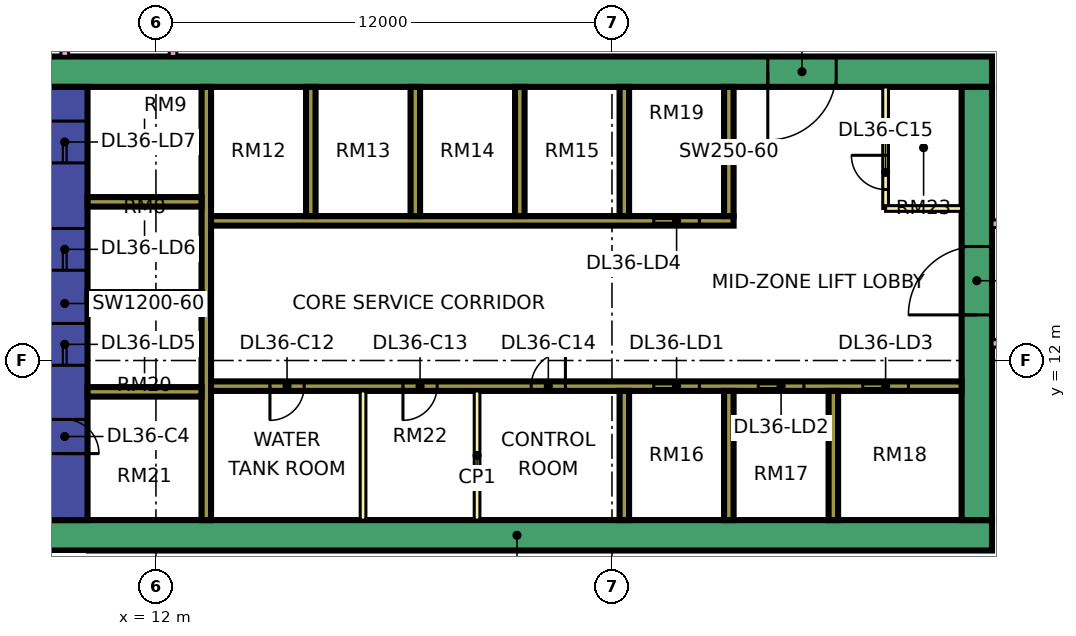
"""IFC4 building model, lengths in metres.
Left out: names, types, materials, properties, quantities, classifications, styles, units other than length and angle.
Written with IfcOpenShell. Run it as: python <this file> out.ifc"""

import sys

from ifc_helpers import new_model, si_unit, direction, frame, frame_2d, origin, place, context, subcontext, project, spatial, rectangle, extrude, element, fill, save


model = new_model("IFC4")
c1 = context("Model", 3, precision=1e-05, world=origin(), true_north=direction((0.0, 1.0)))
c2 = subcontext(c1, "Body", "Model", "MODEL_VIEW")
j1 = project(units=[si_unit("LENGTHUNIT", "METRE"), si_unit("PLANEANGLEUNIT", "RADIAN")], contexts=[c1])
p1 = place(None, origin())
s1 = spatial("IfcSite", under=j1, at=p1, CompositionType="ELEMENT")
p2 = place(p1, origin())
s2 = spatial("IfcBuilding", under=s1, at=p2, CompositionType="ELEMENT")
p3 = place(p2, frame((0.0, 0.0, 161.15)))
s3 = spatial("IfcBuildingStorey", under=s2, at=p3, CompositionType="ELEMENT", Elevation=161.15)
p4 = place(p3, frame((9.0, 7.4, 0.0), z_axis=(0.0, 0.0, 1.0), x_axis=(1.0, 0.0, 0.0)))
e1 = element("IfcWall", 1, at=p4, inside=s3, PredefinedType="SHEAR", context=c2, shape_type="SweptSolid", body=[
    extrude(rectangle(XDim=25.0, YDim=0.8, at=frame_2d((12.5, 0.0))), origin(), (0.0, 0.0, 1.0), 3.75),
])
p5 = place(p3, frame((9.0, 19.6, 0.0), z_axis=(0.0, 0.0, 1.0), x_axis=(1.0, 0.0, 0.0)))
e2 = element("IfcWall", 2, at=p5, inside=s3, PredefinedType="SHEAR", context=c2, shape_type="SweptSolid", body=[
    extrude(rectangle(XDim=25.0, YDim=0.8, at=frame_2d((12.5, 0.0))), origin(), (0.0, 0.0, 1.0), 3.75),
])
p6 = place(p5, frame((19.1, 0.0, 0.0)))
e3 = element("IfcOpeningElement", 3, at=p6, cuts=e2, PredefinedType="OPENING", context=c2, shape_type="SweptSolid", body=[
    extrude(rectangle(XDim=1.8, YDim=2.4, at=frame_2d((0.9, 1.2))), frame((0.0, 0.41, 0.0), z_axis=(0.0, -1.0, 0.0), x_axis=(1.0, 0.0, 0.0)), (0.0, 0.0, 1.0), 0.82),
])
p7 = place(p3, frame((9.6, 7.8, 0.0), z_axis=(0.0, 0.0, 1.0), x_axis=(0.0, 1.0, 0.0)))
e4 = element("IfcWall", 4, at=p7, inside=s3, PredefinedType="SHEAR", context=c2, shape_type="SweptSolid", body=[
    extrude(rectangle(XDim=11.4, YDim=1.2, at=frame_2d((5.7, 0.0))), origin(), (0.0, 0.0, 1.0), 3.75),
])
p8 = place(p7, frame((4.075, 0.0, 0.0)))
e5 = element("IfcOpeningElement", 5, at=p8, cuts=e4, PredefinedType="OPENING", context=c2, shape_type="SweptSolid", body=[
    extrude(rectangle(XDim=1.1, YDim=2.2, at=frame_2d((0.55, 1.1))), frame((0.0, 0.61, 0.0), z_axis=(0.0, -1.0, 0.0), x_axis=(1.0, 0.0, 0.0)), (0.0, 0.0, 1.0), 1.22),
])
p9 = place(p7, frame((6.575, 0.0, 0.0)))
e6 = element("IfcOpeningElement", 6, at=p9, cuts=e4, PredefinedType="OPENING", context=c2, shape_type="SweptSolid", body=[
    extrude(rectangle(XDim=1.1, YDim=2.2, at=frame_2d((0.55, 1.1))), frame((0.0, 0.61, 0.0), z_axis=(0.0, -1.0, 0.0), x_axis=(1.0, 0.0, 0.0)), (0.0, 0.0, 1.0), 1.22),
])
p10 = place(p7, frame((9.4, 0.0, 0.0)))
e7 = element("IfcOpeningElement", 7, at=p10, cuts=e4, PredefinedType="OPENING", context=c2, shape_type="SweptSolid", body=[
    extrude(rectangle(XDim=1.1, YDim=2.2, at=frame_2d((0.55, 1.1))), frame((0.0, 0.61, 0.0), z_axis=(0.0, -1.0, 0.0), x_axis=(1.0, 0.0, 0.0)), (0.0, 0.0, 1.0), 1.22),
])
p11 = place(p7, frame((1.75, 0.0, 0.0)))
e8 = element("IfcOpeningElement", 8, at=p11, cuts=e4, PredefinedType="OPENING", context=c2, shape_type="SweptSolid", body=[
    extrude(rectangle(XDim=0.9, YDim=2.1, at=frame_2d((0.45, 1.05))), frame((0.0, 0.61, 0.0), z_axis=(0.0, -1.0, 0.0), x_axis=(1.0, 0.0, 0.0)), (0.0, 0.0, 1.0), 1.22),
])
p12 = place(p3, frame((33.6, 7.8, 0.0), z_axis=(0.0, 0.0, 1.0), x_axis=(0.0, 1.0, 0.0)))
e9 = element("IfcWall", 9, at=p12, inside=s3, PredefinedType="SHEAR", context=c2, shape_type="SweptSolid", body=[
    extrude(rectangle(XDim=11.4, YDim=0.8, at=frame_2d((5.7, 0.0))), origin(), (0.0, 0.0, 1.0), 3.75),
])
p13 = place(p12, frame((5.4, 0.0, 0.0)))
e10 = element("IfcOpeningElement", 10, at=p13, cuts=e9, PredefinedType="OPENING", context=c2, shape_type="SweptSolid", body=[
    extrude(rectangle(XDim=1.8, YDim=2.4, at=frame_2d((0.9, 1.2))), frame((0.0, 0.41, 0.0), z_axis=(0.0, -1.0, 0.0), x_axis=(1.0, 0.0, 0.0)), (0.0, 0.0, 1.0), 0.82),
])
p14 = place(p3, frame((13.325, 7.8, 0.0), z_axis=(0.0, 0.0, 1.0), x_axis=(0.0, 1.0, 0.0)))
e11 = element("IfcWall", 11, at=p14, inside=s3, PredefinedType="SHEAR", context=c2, shape_type="SweptSolid", body=[
    extrude(rectangle(XDim=11.4, YDim=0.25, at=frame_2d((5.7, 0.0))), origin(), (0.0, 0.0, 1.0), 3.75),
])
p15 = place(p3, frame((13.45, 11.325, 0.0), z_axis=(0.0, 0.0, 1.0), x_axis=(1.0, 0.0, 0.0)))
e12 = element("IfcWall", 12, at=p15, inside=s3, PredefinedType="SHEAR", context=c2, shape_type="SweptSolid", body=[
    extrude(rectangle(XDim=19.75, YDim=0.25, at=frame_2d((9.875, 0.0))), origin(), (0.0, 0.0, 1.0), 3.75),
])
p16 = place(p15, frame((11.65, 0.0, 0.0)))
e13 = element("IfcOpeningElement", 13, at=p16, cuts=e12, PredefinedType="OPENING", context=c2, shape_type="SweptSolid", body=[
    extrude(rectangle(XDim=1.2, YDim=2.2, at=frame_2d((0.6, 1.1))), frame((0.0, 0.135, 0.0), z_axis=(0.0, -1.0, 0.0), x_axis=(1.0, 0.0, 0.0)), (0.0, 0.0, 1.0), 0.27),
])
p17 = place(p15, frame((14.4, 0.0, 0.0)))
e14 = element("IfcOpeningElement", 14, at=p17, cuts=e12, PredefinedType="OPENING", context=c2, shape_type="SweptSolid", body=[
    extrude(rectangle(XDim=1.2, YDim=2.2, at=frame_2d((0.6, 1.1))), frame((0.0, 0.135, 0.0), z_axis=(0.0, -1.0, 0.0), x_axis=(1.0, 0.0, 0.0)), (0.0, 0.0, 1.0), 0.27),
])
p18 = place(p15, frame((17.15, 0.0, 0.0)))
e15 = element("IfcOpeningElement", 15, at=p18, cuts=e12, PredefinedType="OPENING", context=c2, shape_type="SweptSolid", body=[
    extrude(rectangle(XDim=1.2, YDim=2.2, at=frame_2d((0.6, 1.1))), frame((0.0, 0.135, 0.0), z_axis=(0.0, -1.0, 0.0), x_axis=(1.0, 0.0, 0.0)), (0.0, 0.0, 1.0), 0.27),
])
p19 = place(p15, frame((1.55, 0.0, 0.0)))
e16 = element("IfcOpeningElement", 16, at=p19, cuts=e12, PredefinedType="OPENING", context=c2, shape_type="SweptSolid", body=[
    extrude(rectangle(XDim=0.9, YDim=2.1, at=frame_2d((0.45, 1.05))), frame((0.0, 0.135, 0.0), z_axis=(0.0, -1.0, 0.0), x_axis=(1.0, 0.0, 0.0)), (0.0, 0.0, 1.0), 0.27),
])
p20 = place(p15, frame((5.05, 0.0, 0.0)))
e17 = element("IfcOpeningElement", 17, at=p20, cuts=e12, PredefinedType="OPENING", context=c2, shape_type="SweptSolid", body=[
    extrude(rectangle(XDim=0.9, YDim=2.1, at=frame_2d((0.45, 1.05))), frame((0.0, 0.135, 0.0), z_axis=(0.0, -1.0, 0.0), x_axis=(1.0, 0.0, 0.0)), (0.0, 0.0, 1.0), 0.27),
])
p21 = place(p15, frame((8.425, 0.0, 0.0)))
e18 = element("IfcOpeningElement", 18, at=p21, cuts=e12, PredefinedType="OPENING", context=c2, shape_type="SweptSolid", body=[
    extrude(rectangle(XDim=0.9, YDim=2.1, at=frame_2d((0.45, 1.05))), frame((0.0, 0.135, 0.0), z_axis=(0.0, -1.0, 0.0), x_axis=(1.0, 0.0, 0.0)), (0.0, 0.0, 1.0), 0.27),
])
p22 = place(p3, frame((13.45, 15.675, 0.0), z_axis=(0.0, 0.0, 1.0), x_axis=(1.0, 0.0, 0.0)))
e19 = element("IfcWall", 19, at=p22, inside=s3, PredefinedType="SHEAR", context=c2, shape_type="SweptSolid", body=[
    extrude(rectangle(XDim=13.75, YDim=0.25, at=frame_2d((6.875, 0.0))), origin(), (0.0, 0.0, 1.0), 3.75),
])
p23 = place(p22, frame((11.65, 0.0, 0.0)))
e20 = element("IfcOpeningElement", 20, at=p23, cuts=e19, PredefinedType="OPENING", context=c2, shape_type="SweptSolid", body=[
    extrude(rectangle(XDim=1.2, YDim=2.2, at=frame_2d((0.6, 1.1))), frame((0.0, 0.135, 0.0), z_axis=(0.0, -1.0, 0.0), x_axis=(1.0, 0.0, 0.0)), (0.0, 0.0, 1.0), 0.27),
])
for number, where, z_axis, x_axis in (
    (21, (10.2, 11.175, 0.0), (0.0, 0.0, 1.0), (1.0, 0.0, 0.0)),
    (22, (10.2, 13.675, 0.0), (0.0, 0.0, 1.0), (1.0, 0.0, 0.0)),
    (23, (10.2, 16.175, 0.0), (0.0, 0.0, 1.0), (1.0, 0.0, 0.0)),
):
    element("IfcWall", number, at=place(p3, frame(where, z_axis=z_axis, x_axis=x_axis)), inside=s3, PredefinedType="SHEAR", context=c2, shape_type="SweptSolid", body=[
        extrude(rectangle(XDim=3.0, YDim=0.25, at=frame_2d((1.5, 0.0))), origin(), (0.0, 0.0, 1.0), 3.75),
    ])
for number, where, z_axis, x_axis in (
    (24, (24.325, 7.8, 0.0), (0.0, 0.0, 1.0), (0.0, 1.0, 0.0)),
    (25, (27.075, 7.8, 0.0), (0.0, 0.0, 1.0), (0.0, 1.0, 0.0)),
    (26, (29.825, 7.8, 0.0), (0.0, 0.0, 1.0), (0.0, 1.0, 0.0)),
    (27, (16.075, 15.8, 0.0), (0.0, 0.0, 1.0), (0.0, 1.0, 0.0)),
    (28, (18.825, 15.8, 0.0), (0.0, 0.0, 1.0), (0.0, 1.0, 0.0)),
    (29, (21.575, 15.8, 0.0), (0.0, 0.0, 1.0), (0.0, 1.0, 0.0)),
    (30, (24.325, 15.8, 0.0), (0.0, 0.0, 1.0), (0.0, 1.0, 0.0)),
    (31, (27.075, 15.8, 0.0), (0.0, 0.0, 1.0), (0.0, 1.0, 0.0)),
):
    element("IfcWall", number, at=place(p3, frame(where, z_axis=z_axis, x_axis=x_axis)), inside=s3, PredefinedType="SHEAR", context=c2, shape_type="SweptSolid", body=[
        extrude(rectangle(XDim=3.4, YDim=0.25, at=frame_2d((1.7, 0.0))), origin(), (0.0, 0.0, 1.0), 3.75),
    ])
p24 = place(p3, frame((-1.447, 12.553, 0.0), z_axis=(0.0, 0.0, 1.0), x_axis=(0.707106781187, -0.707106781187, 0.0)))
e32 = element("IfcWall", 32, at=p24, inside=s3, PredefinedType="SOLIDWALL", context=c2, shape_type="SweptSolid", body=[
    extrude(rectangle(XDim=19.799, YDim=0.15, at=frame_2d((9.899, 0.0))), origin(), (0.0, 0.0, 1.0), 3.35),
])
p25 = place(p24, frame((2.212, 0.0, 0.45)))
e33 = element("IfcOpeningElement", 33, at=p25, cuts=e32, PredefinedType="OPENING", context=c2, shape_type="SweptSolid", body=[
    extrude(rectangle(XDim=3.0, YDim=2.4, at=frame_2d((1.5, 1.2))), frame((0.0, 0.085, 0.0), z_axis=(0.0, -1.0, 0.0), x_axis=(1.0, 0.0, 0.0)), (0.0, 0.0, 1.0), 0.17),
])
p26 = place(p24, frame((10.216, 0.0, 0.45)))
e34 = element("IfcOpeningElement", 34, at=p26, cuts=e32, PredefinedType="OPENING", context=c2, shape_type="SweptSolid", body=[
    extrude(rectangle(XDim=3.0, YDim=2.4, at=frame_2d((1.5, 1.2))), frame((0.0, 0.085, 0.0), z_axis=(0.0, -1.0, 0.0), x_axis=(1.0, 0.0, 0.0)), (0.0, 0.0, 1.0), 0.17),
])
for number, where, z_axis, x_axis in (
    (35, (17.45, 7.8, 0.0), (0.0, 0.0, 1.0), (0.0, 1.0, 0.0)),
    (36, (20.45, 7.8, 0.0), (0.0, 0.0, 1.0), (0.0, 1.0, 0.0)),
):
    element("IfcWall", number, at=place(p3, frame(where, z_axis=z_axis, x_axis=x_axis)), inside=s3, PredefinedType="PARTITIONING", context=c2, shape_type="SweptSolid", body=[
        extrude(rectangle(XDim=3.4, YDim=0.15, at=frame_2d((1.7, 0.0))), origin(), (0.0, 0.0, 1.0), 3.35),
    ])
p27 = place(p3, frame((31.2, 16.0, 0.0), z_axis=(0.0, 0.0, 1.0), x_axis=(0.0, 1.0, 0.0)))
e37 = element("IfcWall", 37, at=p27, inside=s3, PredefinedType="PARTITIONING", context=c2, shape_type="SweptSolid", body=[
    extrude(rectangle(XDim=3.2, YDim=0.15, at=frame_2d((1.6, 0.0))), origin(), (0.0, 0.0, 1.0), 3.35),
])
p28 = place(p27, frame((0.5, 0.0, 0.0)))
e38 = element("IfcOpeningElement", 38, at=p28, cuts=e37, PredefinedType="OPENING", context=c2, shape_type="SweptSolid", body=[
    extrude(rectangle(XDim=0.9, YDim=2.1, at=frame_2d((0.45, 1.05))), frame((0.0, 0.085, 0.0), z_axis=(0.0, -1.0, 0.0), x_axis=(1.0, 0.0, 0.0)), (0.0, 0.0, 1.0), 0.17),
])
p29 = place(p3, frame((31.2, 16.0, 0.0), z_axis=(0.0, 0.0, 1.0), x_axis=(1.0, 0.0, 0.0)))
e39 = element("IfcWall", 39, at=p29, inside=s3, PredefinedType="PARTITIONING", context=c2, shape_type="SweptSolid", body=[
    extrude(rectangle(XDim=2.0, YDim=0.15, at=frame_2d((1.0, 0.0))), origin(), (0.0, 0.0, 1.0), 3.35),
])
p30 = place(p3, frame((9.6, 20.0, 0.0), z_axis=(0.0, 0.0, 1.0), x_axis=(0.0, 1.0, 0.0)))
e40 = element("IfcWall", 40, at=p30, inside=s3, PredefinedType="PARTITIONING", context=c2, shape_type="SweptSolid", body=[
    extrude(rectangle(XDim=42.926, YDim=0.2, at=frame_2d((21.463, 0.0))), origin(), (0.0, 0.0, 1.0), 3.35),
])
p31 = place(p30, frame((40.8, 0.0, 0.0)))
e41 = element("IfcOpeningElement", 41, at=p31, cuts=e40, PredefinedType="OPENING", context=c2, shape_type="SweptSolid", body=[
    extrude(rectangle(XDim=1.0, YDim=2.1, at=frame_2d((0.5, 1.05))), frame((0.0, 0.11, 0.0), z_axis=(0.0, -1.0, 0.0), x_axis=(1.0, 0.0, 0.0)), (0.0, 0.0, 1.0), 0.22),
])
p32 = place(p30, frame((0.6, 0.0, 0.0)))
e42 = element("IfcOpeningElement", 42, at=p32, cuts=e40, PredefinedType="OPENING", context=c2, shape_type="SweptSolid", body=[
    extrude(rectangle(XDim=1.2, YDim=2.1, at=frame_2d((0.6, 1.05))), frame((0.0, 0.11, 0.0), z_axis=(0.0, -1.0, 0.0), x_axis=(1.0, 0.0, 0.0)), (0.0, 0.0, 1.0), 0.22),
])
p33 = place(p30, frame((3.9, 0.0, 0.0)))
e43 = element("IfcOpeningElement", 43, at=p33, cuts=e40, PredefinedType="OPENING", context=c2, shape_type="SweptSolid", body=[
    extrude(rectangle(XDim=1.0, YDim=2.1, at=frame_2d((0.5, 1.05))), frame((0.0, 0.11, 0.0), z_axis=(0.0, -1.0, 0.0), x_axis=(1.0, 0.0, 0.0)), (0.0, 0.0, 1.0), 0.22),
])
p34 = place(p3, frame((12.45, 20.0, 0.0), z_axis=(0.0, 0.0, 1.0), x_axis=(0.0, 1.0, 0.0)))
e44 = element("IfcWall", 44, at=p34, inside=s3, PredefinedType="PARTITIONING", context=c2, shape_type="SweptSolid", body=[
    extrude(rectangle(XDim=43.0, YDim=0.2, at=frame_2d((21.5, 0.0))), origin(), (0.0, 0.0, 1.0), 3.35),
])
p35 = place(p34, frame((5.95, 0.0, 0.0)))
e45 = element("IfcOpeningElement", 45, at=p35, cuts=e44, PredefinedType="OPENING", context=c2, shape_type="SweptSolid", body=[
    extrude(rectangle(XDim=1.0, YDim=2.1, at=frame_2d((0.5, 1.05))), frame((0.0, 0.11, 0.0), z_axis=(0.0, -1.0, 0.0), x_axis=(1.0, 0.0, 0.0)), (0.0, 0.0, 1.0), 0.22),
])
p36 = place(p34, frame((12.0, 0.0, 0.0)))
e46 = element("IfcOpeningElement", 46, at=p36, cuts=e44, PredefinedType="OPENING", context=c2, shape_type="SweptSolid", body=[
    extrude(rectangle(XDim=1.0, YDim=2.1, at=frame_2d((0.5, 1.05))), frame((0.0, 0.11, 0.0), z_axis=(0.0, -1.0, 0.0), x_axis=(1.0, 0.0, 0.0)), (0.0, 0.0, 1.0), 0.22),
])
p37 = place(p34, frame((23.35, 0.0, 0.0)))
e47 = element("IfcOpeningElement", 47, at=p37, cuts=e44, PredefinedType="OPENING", context=c2, shape_type="SweptSolid", body=[
    extrude(rectangle(XDim=1.0, YDim=2.1, at=frame_2d((0.5, 1.05))), frame((0.0, 0.11, 0.0), z_axis=(0.0, -1.0, 0.0), x_axis=(1.0, 0.0, 0.0)), (0.0, 0.0, 1.0), 0.22),
])
p38 = place(p34, frame((35.2, 0.0, 0.0)))
e48 = element("IfcOpeningElement", 48, at=p38, cuts=e44, PredefinedType="OPENING", context=c2, shape_type="SweptSolid", body=[
    extrude(rectangle(XDim=1.0, YDim=2.1, at=frame_2d((0.5, 1.05))), frame((0.0, 0.11, 0.0), z_axis=(0.0, -1.0, 0.0), x_axis=(1.0, 0.0, 0.0)), (0.0, 0.0, 1.0), 0.22),
])
p39 = place(p34, frame((1.15, 0.0, 0.0)))
e49 = element("IfcOpeningElement", 49, at=p39, cuts=e44, PredefinedType="OPENING", context=c2, shape_type="SweptSolid", body=[
    extrude(rectangle(XDim=1.8, YDim=2.1, at=frame_2d((0.9, 1.05))), frame((0.0, 0.11, 0.0), z_axis=(0.0, -1.0, 0.0), x_axis=(1.0, 0.0, 0.0)), (0.0, 0.0, 1.0), 0.22),
])
p40 = place(p34, frame((28.6, 0.0, 0.0)))
e50 = element("IfcOpeningElement", 50, at=p40, cuts=e44, PredefinedType="OPENING", context=c2, shape_type="SweptSolid", body=[
    extrude(rectangle(XDim=1.8, YDim=2.1, at=frame_2d((0.9, 1.05))), frame((0.0, 0.11, 0.0), z_axis=(0.0, -1.0, 0.0), x_axis=(1.0, 0.0, 0.0)), (0.0, 0.0, 1.0), 0.22),
])
p41 = place(p3, frame((34.0, 12.45, 0.0), z_axis=(0.0, 0.0, 1.0), x_axis=(1.0, 0.0, 0.0)))
e51 = element("IfcWall", 51, at=p41, inside=s3, PredefinedType="PARTITIONING", context=c2, shape_type="SweptSolid", body=[
    extrude(rectangle(XDim=2.451, YDim=0.2, at=frame_2d((1.226, 0.0))), origin(), (0.0, 0.0, 1.0), 3.35),
])
p42 = place(p3, frame((34.0, 15.6, 0.0), z_axis=(0.0, 0.0, 1.0), x_axis=(1.0, 0.0, 0.0)))
e52 = element("IfcWall", 52, at=p42, inside=s3, PredefinedType="PARTITIONING", context=c2, shape_type="SweptSolid", body=[
    extrude(rectangle(XDim=10.35, YDim=0.2, at=frame_2d((5.175, 0.0))), origin(), (0.0, 0.0, 1.0), 3.35),
])
p43 = place(p42, frame((5.6, 0.0, 0.0)))
e53 = element("IfcOpeningElement", 53, at=p43, cuts=e52, PredefinedType="OPENING", context=c2, shape_type="SweptSolid", body=[
    extrude(rectangle(XDim=1.0, YDim=2.1, at=frame_2d((0.5, 1.05))), frame((0.0, 0.11, 0.0), z_axis=(0.0, -1.0, 0.0), x_axis=(1.0, 0.0, 0.0)), (0.0, 0.0, 1.0), 0.22),
])
p44 = place(p42, frame((0.45, 0.0, 0.0)))
e54 = element("IfcOpeningElement", 54, at=p44, cuts=e52, PredefinedType="OPENING", context=c2, shape_type="SweptSolid", body=[
    extrude(rectangle(XDim=1.2, YDim=2.1, at=frame_2d((0.6, 1.05))), frame((0.0, 0.11, 0.0), z_axis=(0.0, -1.0, 0.0), x_axis=(1.0, 0.0, 0.0)), (0.0, 0.0, 1.0), 0.22),
])
p45 = place(p16, origin())
e55 = element("IfcDoor", 55, at=p45, inside=s3, OperationType="DOUBLE_DOOR_SLIDING", PredefinedType="DOOR", context=c2, shape_type="SweptSolid", body=[
    extrude(rectangle(XDim=1.2, YDim=2.2, at=frame_2d((0.6, 1.1))), frame((0.0, 0.025, 0.0), z_axis=(0.0, -1.0, 0.0), x_axis=(1.0, 0.0, 0.0)), (0.0, 0.0, 1.0), 0.05),
])
fill(e13, e55)
p46 = place(p17, origin())
e56 = element("IfcDoor", 56, at=p46, inside=s3, OperationType="DOUBLE_DOOR_SLIDING", PredefinedType="DOOR", context=c2, shape_type="SweptSolid", body=[
    extrude(rectangle(XDim=1.2, YDim=2.2, at=frame_2d((0.6, 1.1))), frame((0.0, 0.025, 0.0), z_axis=(0.0, -1.0, 0.0), x_axis=(1.0, 0.0, 0.0)), (0.0, 0.0, 1.0), 0.05),
])
fill(e14, e56)
p47 = place(p18, origin())
e57 = element("IfcDoor", 57, at=p47, inside=s3, OperationType="DOUBLE_DOOR_SLIDING", PredefinedType="DOOR", context=c2, shape_type="SweptSolid", body=[
    extrude(rectangle(XDim=1.2, YDim=2.2, at=frame_2d((0.6, 1.1))), frame((0.0, 0.025, 0.0), z_axis=(0.0, -1.0, 0.0), x_axis=(1.0, 0.0, 0.0)), (0.0, 0.0, 1.0), 0.05),
])
fill(e15, e57)
p48 = place(p23, origin())
e58 = element("IfcDoor", 58, at=p48, inside=s3, OperationType="DOUBLE_DOOR_SLIDING", PredefinedType="DOOR", context=c2, shape_type="SweptSolid", body=[
    extrude(rectangle(XDim=1.2, YDim=2.2, at=frame_2d((0.6, 1.1))), frame((0.0, 0.025, 0.0), z_axis=(0.0, -1.0, 0.0), x_axis=(1.0, 0.0, 0.0)), (0.0, 0.0, 1.0), 0.05),
])
fill(e20, e58)
p49 = place(p8, origin())
e59 = element("IfcDoor", 59, at=p49, inside=s3, OperationType="DOUBLE_DOOR_SLIDING", PredefinedType="DOOR", context=c2, shape_type="SweptSolid", body=[
    extrude(rectangle(XDim=1.1, YDim=2.2, at=frame_2d((0.55, 1.1))), frame((0.0, 0.025, 0.0), z_axis=(0.0, -1.0, 0.0), x_axis=(1.0, 0.0, 0.0)), (0.0, 0.0, 1.0), 0.05),
])
fill(e5, e59)
p50 = place(p9, origin())
e60 = element("IfcDoor", 60, at=p50, inside=s3, OperationType="DOUBLE_DOOR_SLIDING", PredefinedType="DOOR", context=c2, shape_type="SweptSolid", body=[
    extrude(rectangle(XDim=1.1, YDim=2.2, at=frame_2d((0.55, 1.1))), frame((0.0, 0.025, 0.0), z_axis=(0.0, -1.0, 0.0), x_axis=(1.0, 0.0, 0.0)), (0.0, 0.0, 1.0), 0.05),
])
fill(e6, e60)
p51 = place(p10, origin())
e61 = element("IfcDoor", 61, at=p51, inside=s3, OperationType="DOUBLE_DOOR_SLIDING", PredefinedType="DOOR", context=c2, shape_type="SweptSolid", body=[
    extrude(rectangle(XDim=1.1, YDim=2.2, at=frame_2d((0.55, 1.1))), frame((0.0, 0.025, 0.0), z_axis=(0.0, -1.0, 0.0), x_axis=(1.0, 0.0, 0.0)), (0.0, 0.0, 1.0), 0.05),
])
fill(e7, e61)
p52 = place(p13, origin())
e62 = element("IfcDoor", 62, at=p52, inside=s3, OperationType="DOUBLE_DOOR_SINGLE_SWING", PredefinedType="DOOR", context=c2, shape_type="SweptSolid", body=[
    extrude(rectangle(XDim=1.8, YDim=2.4, at=frame_2d((0.9, 1.2))), frame((0.0, 0.025, 0.0), z_axis=(0.0, -1.0, 0.0), x_axis=(1.0, 0.0, 0.0)), (0.0, 0.0, 1.0), 0.05),
])
fill(e10, e62)
p53 = place(p6, frame((1.8, 0.0, 0.0), z_axis=(0.0, 0.0, 1.0), x_axis=(-1.0, 0.0, 0.0)))
e63 = element("IfcDoor", 63, at=p53, inside=s3, OperationType="DOUBLE_DOOR_SINGLE_SWING", PredefinedType="DOOR", context=c2, shape_type="SweptSolid", body=[
    extrude(rectangle(XDim=1.8, YDim=2.4, at=frame_2d((0.9, 1.2))), frame((0.0, 0.025, 0.0), z_axis=(0.0, -1.0, 0.0), x_axis=(1.0, 0.0, 0.0)), (0.0, 0.0, 1.0), 0.05),
])
fill(e3, e63)
p54 = place(p11, frame((0.9, 0.0, 0.0), z_axis=(0.0, 0.0, 1.0), x_axis=(-1.0, 0.0, 0.0)))
e64 = element("IfcDoor", 64, at=p54, inside=s3, OperationType="SINGLE_SWING_LEFT", PredefinedType="DOOR", context=c2, shape_type="SweptSolid", body=[
    extrude(rectangle(XDim=0.9, YDim=2.1, at=frame_2d((0.45, 1.05))), frame((0.0, 0.025, 0.0), z_axis=(0.0, -1.0, 0.0), x_axis=(1.0, 0.0, 0.0)), (0.0, 0.0, 1.0), 0.05),
])
fill(e8, e64)
p55 = place(p19, frame((0.9, 0.0, 0.0), z_axis=(0.0, 0.0, 1.0), x_axis=(-1.0, 0.0, 0.0)))
e65 = element("IfcDoor", 65, at=p55, inside=s3, OperationType="SINGLE_SWING_LEFT", PredefinedType="DOOR", context=c2, shape_type="SweptSolid", body=[
    extrude(rectangle(XDim=0.9, YDim=2.1, at=frame_2d((0.45, 1.05))), frame((0.0, 0.025, 0.0), z_axis=(0.0, -1.0, 0.0), x_axis=(1.0, 0.0, 0.0)), (0.0, 0.0, 1.0), 0.05),
])
fill(e16, e65)
p56 = place(p20, frame((0.9, 0.0, 0.0), z_axis=(0.0, 0.0, 1.0), x_axis=(-1.0, 0.0, 0.0)))
e66 = element("IfcDoor", 66, at=p56, inside=s3, OperationType="SINGLE_SWING_LEFT", PredefinedType="DOOR", context=c2, shape_type="SweptSolid", body=[
    extrude(rectangle(XDim=0.9, YDim=2.1, at=frame_2d((0.45, 1.05))), frame((0.0, 0.025, 0.0), z_axis=(0.0, -1.0, 0.0), x_axis=(1.0, 0.0, 0.0)), (0.0, 0.0, 1.0), 0.05),
])
fill(e17, e66)
p57 = place(p21, frame((0.9, 0.0, 0.0), z_axis=(0.0, 0.0, 1.0), x_axis=(-1.0, 0.0, 0.0)))
e67 = element("IfcDoor", 67, at=p57, inside=s3, OperationType="SINGLE_SWING_RIGHT", PredefinedType="DOOR", context=c2, shape_type="SweptSolid", body=[
    extrude(rectangle(XDim=0.9, YDim=2.1, at=frame_2d((0.45, 1.05))), frame((0.0, 0.025, 0.0), z_axis=(0.0, -1.0, 0.0), x_axis=(1.0, 0.0, 0.0)), (0.0, 0.0, 1.0), 0.05),
])
fill(e18, e67)
p58 = place(p28, frame((0.9, 0.0, 0.0), z_axis=(0.0, 0.0, 1.0), x_axis=(-1.0, 0.0, 0.0)))
e68 = element("IfcDoor", 68, at=p58, inside=s3, OperationType="SINGLE_SWING_RIGHT", PredefinedType="DOOR", context=c2, shape_type="SweptSolid", body=[
    extrude(rectangle(XDim=0.9, YDim=2.1, at=frame_2d((0.45, 1.05))), frame((0.0, 0.025, 0.0), z_axis=(0.0, -1.0, 0.0), x_axis=(1.0, 0.0, 0.0)), (0.0, 0.0, 1.0), 0.05),
])
fill(e38, e68)
save(model, sys.argv[1])
